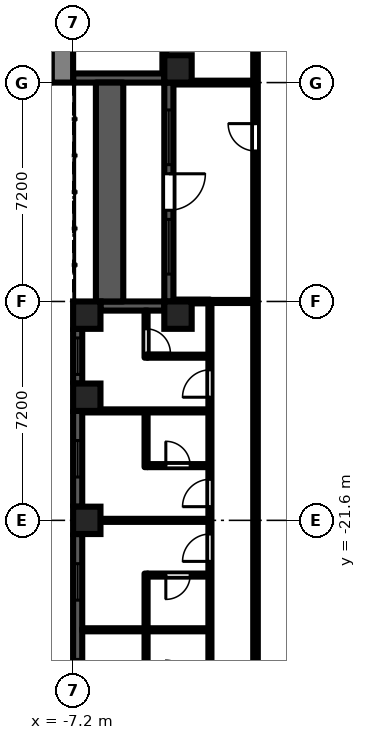
"""IFC4 building model, lengths in metres.
Left out: names, types, materials, properties, quantities, classifications, styles, units other than length and angle.
Written with IfcOpenShell. Run it as: python <this file> out.ifc"""

import sys

from ifc_helpers import new_model, si_unit, direction, frame, frame_2d, origin, origin_2d, place, context, subcontext, project, spatial, rectangle, extrude, element, fill, save


model = new_model("IFC4")
c1 = context("Model", 3, precision=1e-05, world=origin(), true_north=direction((0.0, 1.0)))
c2 = subcontext(c1, "Body", "Model", "MODEL_VIEW")
j1 = project(units=[si_unit("LENGTHUNIT", "METRE"), si_unit("PLANEANGLEUNIT", "RADIAN")], contexts=[c1])
p1 = place(None, origin())
s1 = spatial("IfcSite", under=j1, at=p1, CompositionType="ELEMENT")
p2 = place(p1, origin())
s2 = spatial("IfcBuilding", under=s1, at=p2, CompositionType="ELEMENT")
p3 = place(p2, frame((0.0, 0.0, 11.7)))
s3 = spatial("IfcBuildingStorey", under=s2, at=p3, CompositionType="ELEMENT", Elevation=11.7)
for number, where, z_axis, x_axis in (
    (1, (-6.75, -21.6, 0.0), (0.0, 0.0, 1.0), (1.0, 0.0, 0.0)),
    (2, (-6.75, -17.55, 0.0), (0.0, 0.0, 1.0), (1.0, 0.0, 0.0)),
    (3, (-6.75, -14.85, 0.0), (0.0, 0.0, 1.0), (1.0, 0.0, 0.0)),
    (4, (-3.75, -14.85, 0.0), (0.0, 0.0, 1.0), (1.0, 0.0, 0.0)),
    (5, (-3.75, -6.75, 0.0), (0.0, 0.0, 1.0), (1.0, 0.0, 0.0)),
):
    element("IfcColumn", number, at=place(p3, frame(where, z_axis=z_axis, x_axis=x_axis)), inside=s3, PredefinedType="COLUMN", context=c2, shape_type="SweptSolid", body=[
        extrude(rectangle(XDim=0.9, YDim=0.9, at=origin_2d()), origin(), (0.0, 0.0, 1.0), 3.0),
    ])
p4 = place(p3, frame((-7.2, -7.05, 0.0), z_axis=(0.0, 0.0, 1.0), x_axis=(1.0, 0.0, 0.0)))
e6 = element("IfcWall", 6, at=p4, inside=s3, PredefinedType="SOLIDWALL", context=c2, shape_type="SweptSolid", body=[
    extrude(rectangle(XDim=3.0, YDim=0.3, at=frame_2d((1.5, 0.0))), origin(), (0.0, 0.0, 1.0), 2.1),
])
p5 = place(p3, frame((-4.05, -7.2, 0.0), z_axis=(0.0, 0.0, 1.0), x_axis=(0.0, -1.0, 0.0)))
e7 = element("IfcWall", 7, at=p5, inside=s3, PredefinedType="SOLIDWALL", context=c2, shape_type="SweptSolid", body=[
    extrude(rectangle(XDim=7.2, YDim=0.3, at=frame_2d((3.6, 0.0))), origin(), (0.0, 0.0, 1.0), 2.1),
])
p6 = place(p5, frame((3.0, 0.0, 0.0)))
e8 = element("IfcOpeningElement", 8, at=p6, cuts=e7, PredefinedType="OPENING", context=c2, shape_type="SweptSolid", body=[
    extrude(rectangle(XDim=1.2, YDim=2.05, at=frame_2d((0.6, 1.025))), frame((0.0, 0.16, 0.0), z_axis=(0.0, -1.0, 0.0), x_axis=(1.0, 0.0, 0.0)), (0.0, 0.0, 1.0), 0.32),
])
p7 = place(p5, frame((0.9, 0.0, 0.2)))
e9 = element("IfcOpeningElement", 9, at=p7, cuts=e7, PredefinedType="OPENING", context=c2, shape_type="SweptSolid", body=[
    extrude(rectangle(XDim=1.8, YDim=1.85, at=frame_2d((0.9, 0.925))), frame((0.0, 0.16, 0.0), z_axis=(0.0, -1.0, 0.0), x_axis=(1.0, 0.0, 0.0)), (0.0, 0.0, 1.0), 0.32),
])
p8 = place(p5, frame((4.5, 0.0, 0.2)))
e10 = element("IfcOpeningElement", 10, at=p8, cuts=e7, PredefinedType="OPENING", context=c2, shape_type="SweptSolid", body=[
    extrude(rectangle(XDim=1.8, YDim=1.85, at=frame_2d((0.9, 0.925))), frame((0.0, 0.16, 0.0), z_axis=(0.0, -1.0, 0.0), x_axis=(1.0, 0.0, 0.0)), (0.0, 0.0, 1.0), 0.32),
])
p9 = place(p3, frame((-4.2, -14.55, 0.0), z_axis=(0.0, 0.0, 1.0), x_axis=(-1.0, 0.0, 0.0)))
e11 = element("IfcWall", 11, at=p9, inside=s3, PredefinedType="SOLIDWALL", context=c2, shape_type="SweptSolid", body=[
    extrude(rectangle(XDim=2.1, YDim=0.3, at=frame_2d((1.05, 0.0))), origin(), (0.0, 0.0, 1.0), 2.1),
])
p10 = place(p3, frame((-7.05, -15.3, 0.0), z_axis=(0.0, 0.0, 1.0), x_axis=(0.0, -1.0, 0.0)))
e12 = element("IfcWall", 12, at=p10, inside=s3, PredefinedType="SOLIDWALL", context=c2, shape_type="SweptSolid", body=[
    extrude(rectangle(XDim=1.8, YDim=0.3, at=frame_2d((0.9, 0.0))), origin(), (0.0, 0.0, 1.0), 2.1),
])
p11 = place(p10, frame((0.3, 0.0, 0.2)))
e13 = element("IfcOpeningElement", 13, at=p11, cuts=e12, PredefinedType="OPENING", context=c2, shape_type="SweptSolid", body=[
    extrude(rectangle(XDim=1.2, YDim=1.85, at=frame_2d((0.6, 0.925))), frame((0.0, 0.16, 0.0), z_axis=(0.0, -1.0, 0.0), x_axis=(1.0, 0.0, 0.0)), (0.0, 0.0, 1.0), 0.32),
])
p12 = place(p3, frame((-7.05, -18.0, 0.0), z_axis=(0.0, 0.0, 1.0), x_axis=(0.0, -1.0, 0.0)))
e14 = element("IfcWall", 14, at=p12, inside=s3, PredefinedType="SOLIDWALL", context=c2, shape_type="SweptSolid", body=[
    extrude(rectangle(XDim=3.15, YDim=0.3, at=frame_2d((1.575, 0.0))), origin(), (0.0, 0.0, 1.0), 2.1),
])
p13 = place(p12, frame((0.975, 0.0, 0.2)))
e15 = element("IfcOpeningElement", 15, at=p13, cuts=e14, PredefinedType="OPENING", context=c2, shape_type="SweptSolid", body=[
    extrude(rectangle(XDim=1.2, YDim=1.85, at=frame_2d((0.6, 0.925))), frame((0.0, 0.16, 0.0), z_axis=(0.0, -1.0, 0.0), x_axis=(1.0, 0.0, 0.0)), (0.0, 0.0, 1.0), 0.32),
])
p14 = place(p3, frame((-7.05, -22.05, 0.0), z_axis=(0.0, 0.0, 1.0), x_axis=(0.0, -1.0, 0.0)))
e16 = element("IfcWall", 16, at=p14, inside=s3, PredefinedType="SOLIDWALL", context=c2, shape_type="SweptSolid", body=[
    extrude(rectangle(XDim=6.3, YDim=0.3, at=frame_2d((3.15, 0.0))), origin(), (0.0, 0.0, 1.0), 2.1),
])
p15 = place(p14, frame((0.975, 0.0, 0.2)))
e17 = element("IfcOpeningElement", 17, at=p15, cuts=e16, PredefinedType="OPENING", context=c2, shape_type="SweptSolid", body=[
    extrude(rectangle(XDim=1.2, YDim=1.85, at=frame_2d((0.6, 0.925))), frame((0.0, 0.16, 0.0), z_axis=(0.0, -1.0, 0.0), x_axis=(1.0, 0.0, 0.0)), (0.0, 0.0, 1.0), 0.32),
])
p16 = place(p14, frame((4.125, 0.0, 0.2)))
e18 = element("IfcOpeningElement", 18, at=p16, cuts=e16, PredefinedType="OPENING", context=c2, shape_type="SweptSolid", body=[
    extrude(rectangle(XDim=1.2, YDim=1.85, at=frame_2d((0.6, 0.925))), frame((0.0, 0.16, 0.0), z_axis=(0.0, -1.0, 0.0), x_axis=(1.0, 0.0, 0.0)), (0.0, 0.0, 1.0), 0.32),
])
p17 = place(p3, frame((-6.0, -14.4, 0.0), z_axis=(0.0, 0.0, 1.0), x_axis=(0.0, 1.0, 0.0)))
e19 = element("IfcWall", 19, at=p17, inside=s3, PredefinedType="PARAPET", context=c2, shape_type="SweptSolid", body=[
    extrude(rectangle(XDim=7.2, YDim=0.9, at=frame_2d((3.6, 0.0))), origin(), (0.0, 0.0, 1.0), 0.8),
])
p18 = place(p3, frame((-7.55, -7.2, 0.0), z_axis=(0.0, 0.0, 1.0), x_axis=(0.0, 1.0, 0.0)))
e20 = element("IfcWall", 20, at=p18, inside=s3, PredefinedType="SHEAR", context=c2, shape_type="SweptSolid", body=[
    extrude(rectangle(XDim=14.4, YDim=0.7, at=frame_2d((7.2, 0.0))), origin(), (0.0, 0.0, 1.0), 2.575),
])
p19 = place(p18, frame((6.0, 0.0, 0.0)))
e21 = element("IfcOpeningElement", 21, at=p19, cuts=e20, PredefinedType="OPENING", context=c2, shape_type="SweptSolid", body=[
    extrude(rectangle(XDim=2.4, YDim=2.2, at=frame_2d((1.2, 1.1))), frame((0.0, 0.36, 0.0), z_axis=(0.0, -1.0, 0.0), x_axis=(1.0, 0.0, 0.0)), (0.0, 0.0, 1.0), 0.72),
])
for number, where, z_axis, x_axis in (
    (22, (-6.9, -25.2, 0.0), (0.0, 0.0, 1.0), (1.0, 0.0, 0.0)),
    (23, (-6.9, -21.6, 0.0), (0.0, 0.0, 1.0), (1.0, 0.0, 0.0)),
    (24, (-6.9, -18.0, 0.0), (0.0, 0.0, 1.0), (1.0, 0.0, 0.0)),
):
    element("IfcWall", number, at=place(p3, frame(where, z_axis=z_axis, x_axis=x_axis)), inside=s3, PredefinedType="PARTITIONING", context=c2, shape_type="SweptSolid", body=[
        extrude(rectangle(XDim=4.15, YDim=0.1, at=frame_2d((2.075, 0.0))), origin(), (0.0, 0.0, 1.0), 2.575),
    ])
p20 = place(p3, frame((-4.8, -27.05, 0.0), z_axis=(0.0, 0.0, 1.0), x_axis=(0.0, 1.0, 0.0)))
e25 = element("IfcWall", 25, at=p20, inside=s3, PredefinedType="PARTITIONING", context=c2, shape_type="SweptSolid", body=[
    extrude(rectangle(XDim=3.7, YDim=0.1, at=frame_2d((1.85, 0.0))), origin(), (0.0, 0.0, 1.0), 2.575),
])
p21 = place(p3, frame((-4.75, -23.4, 0.0), z_axis=(0.0, 0.0, 1.0), x_axis=(1.0, 0.0, 0.0)))
e26 = element("IfcWall", 26, at=p21, inside=s3, PredefinedType="PARTITIONING", context=c2, shape_type="SweptSolid", body=[
    extrude(rectangle(XDim=2.0, YDim=0.1, at=frame_2d((1.0, 0.0))), origin(), (0.0, 0.0, 1.0), 2.575),
])
p22 = place(p21, frame((0.6, 0.0, 0.0)))
e27 = element("IfcOpeningElement", 27, at=p22, cuts=e26, PredefinedType="OPENING", context=c2, shape_type="SweptSolid", body=[
    extrude(rectangle(XDim=0.8, YDim=2.1, at=frame_2d((0.4, 1.05))), frame((0.0, 0.06, 0.0), z_axis=(0.0, -1.0, 0.0), x_axis=(1.0, 0.0, 0.0)), (0.0, 0.0, 1.0), 0.12),
])
p23 = place(p3, frame((-4.8, -19.85, 0.0), z_axis=(0.0, 0.0, 1.0), x_axis=(0.0, 1.0, 0.0)))
e28 = element("IfcWall", 28, at=p23, inside=s3, PredefinedType="PARTITIONING", context=c2, shape_type="SweptSolid", body=[
    extrude(rectangle(XDim=1.8, YDim=0.1, at=frame_2d((0.9, 0.0))), origin(), (0.0, 0.0, 1.0), 2.575),
])
p24 = place(p3, frame((-4.75, -19.8, 0.0), z_axis=(0.0, 0.0, 1.0), x_axis=(1.0, 0.0, 0.0)))
e29 = element("IfcWall", 29, at=p24, inside=s3, PredefinedType="PARTITIONING", context=c2, shape_type="SweptSolid", body=[
    extrude(rectangle(XDim=2.0, YDim=0.1, at=frame_2d((1.0, 0.0))), origin(), (0.0, 0.0, 1.0), 2.575),
])
p25 = place(p24, frame((0.6, 0.0, 0.0)))
e30 = element("IfcOpeningElement", 30, at=p25, cuts=e29, PredefinedType="OPENING", context=c2, shape_type="SweptSolid", body=[
    extrude(rectangle(XDim=0.8, YDim=2.1, at=frame_2d((0.4, 1.05))), frame((0.0, 0.06, 0.0), z_axis=(0.0, -1.0, 0.0), x_axis=(1.0, 0.0, 0.0)), (0.0, 0.0, 1.0), 0.12),
])
p26 = place(p3, frame((-4.8, -16.25, 0.0), z_axis=(0.0, 0.0, 1.0), x_axis=(0.0, 1.0, 0.0)))
e31 = element("IfcWall", 31, at=p26, inside=s3, PredefinedType="PARTITIONING", context=c2, shape_type="SweptSolid", body=[
    extrude(rectangle(XDim=1.55, YDim=0.1, at=frame_2d((0.775, 0.0))), origin(), (0.0, 0.0, 1.0), 2.575),
])
p27 = place(p26, frame((0.15, 0.0, 0.0)))
e32 = element("IfcOpeningElement", 32, at=p27, cuts=e31, PredefinedType="OPENING", context=c2, shape_type="SweptSolid", body=[
    extrude(rectangle(XDim=0.8, YDim=2.1, at=frame_2d((0.4, 1.05))), frame((0.0, 0.06, 0.0), z_axis=(0.0, -1.0, 0.0), x_axis=(1.0, 0.0, 0.0)), (0.0, 0.0, 1.0), 0.12),
])
p28 = place(p3, frame((-4.75, -16.2, 0.0), z_axis=(0.0, 0.0, 1.0), x_axis=(1.0, 0.0, 0.0)))
e33 = element("IfcWall", 33, at=p28, inside=s3, PredefinedType="PARTITIONING", context=c2, shape_type="SweptSolid", body=[
    extrude(rectangle(XDim=2.0, YDim=0.1, at=frame_2d((1.0, 0.0))), origin(), (0.0, 0.0, 1.0), 2.575),
])
p29 = place(p3, frame((-4.2, -6.9, 0.0), z_axis=(0.0, 0.0, 1.0), x_axis=(0.0, 1.0, 0.0)))
e34 = element("IfcWall", 34, at=p29, inside=s3, PredefinedType="PARTITIONING", context=c2, shape_type="SweptSolid", body=[
    extrude(rectangle(XDim=5.625, YDim=0.125, at=frame_2d((2.812, 0.0))), origin(), (0.0, 0.0, 1.0), 2.575),
])
p30 = place(p3, frame((-3.9, -14.4, 0.0), z_axis=(0.0, 0.0, 1.0), x_axis=(1.0, 0.0, 0.0)))
e35 = element("IfcWall", 35, at=p30, inside=s3, PredefinedType="PARTITIONING", context=c2, shape_type="SweptSolid", body=[
    extrude(rectangle(XDim=1.2, YDim=0.125, at=frame_2d((0.6, 0.0))), origin(), (0.0, 0.0, 1.0), 2.575),
])
p31 = place(p3, frame((-3.9, -7.2, 0.0), z_axis=(0.0, 0.0, 1.0), x_axis=(1.0, 0.0, 0.0)))
e36 = element("IfcWall", 36, at=p31, inside=s3, PredefinedType="PARTITIONING", context=c2, shape_type="SweptSolid", body=[
    extrude(rectangle(XDim=2.625, YDim=0.125, at=frame_2d((1.312, 0.0))), origin(), (0.0, 0.0, 1.0), 2.575),
])
p32 = place(p3, frame((-2.7, -32.35, 0.0), z_axis=(0.0, 0.0, 1.0), x_axis=(0.0, 1.0, 0.0)))
e37 = element("IfcWall", 37, at=p32, inside=s3, PredefinedType="PARTITIONING", context=c2, shape_type="SweptSolid", body=[
    extrude(rectangle(XDim=17.888, YDim=0.1, at=frame_2d((8.944, 0.0))), origin(), (0.0, 0.0, 1.0), 2.575),
])
p33 = place(p32, frame((2.2, 0.0, 0.0)))
e38 = element("IfcOpeningElement", 38, at=p33, cuts=e37, PredefinedType="OPENING", context=c2, shape_type="SweptSolid", body=[
    extrude(rectangle(XDim=0.9, YDim=2.1, at=frame_2d((0.45, 1.05))), frame((0.0, 0.06, 0.0), z_axis=(0.0, -1.0, 0.0), x_axis=(1.0, 0.0, 0.0)), (0.0, 0.0, 1.0), 0.12),
])
p34 = place(p32, frame((4.0, 0.0, 0.0)))
e39 = element("IfcOpeningElement", 39, at=p34, cuts=e37, PredefinedType="OPENING", context=c2, shape_type="SweptSolid", body=[
    extrude(rectangle(XDim=0.9, YDim=2.1, at=frame_2d((0.45, 1.05))), frame((0.0, 0.06, 0.0), z_axis=(0.0, -1.0, 0.0), x_axis=(1.0, 0.0, 0.0)), (0.0, 0.0, 1.0), 0.12),
])
p35 = place(p32, frame((9.4, 0.0, 0.0)))
e40 = element("IfcOpeningElement", 40, at=p35, cuts=e37, PredefinedType="OPENING", context=c2, shape_type="SweptSolid", body=[
    extrude(rectangle(XDim=0.9, YDim=2.1, at=frame_2d((0.45, 1.05))), frame((0.0, 0.06, 0.0), z_axis=(0.0, -1.0, 0.0), x_axis=(1.0, 0.0, 0.0)), (0.0, 0.0, 1.0), 0.12),
])
p36 = place(p32, frame((11.2, 0.0, 0.0)))
e41 = element("IfcOpeningElement", 41, at=p36, cuts=e37, PredefinedType="OPENING", context=c2, shape_type="SweptSolid", body=[
    extrude(rectangle(XDim=0.9, YDim=2.1, at=frame_2d((0.45, 1.05))), frame((0.0, 0.06, 0.0), z_axis=(0.0, -1.0, 0.0), x_axis=(1.0, 0.0, 0.0)), (0.0, 0.0, 1.0), 0.12),
])
p37 = place(p32, frame((14.8, 0.0, 0.0)))
e42 = element("IfcOpeningElement", 42, at=p37, cuts=e37, PredefinedType="OPENING", context=c2, shape_type="SweptSolid", body=[
    extrude(rectangle(XDim=0.9, YDim=2.1, at=frame_2d((0.45, 1.05))), frame((0.0, 0.06, 0.0), z_axis=(0.0, -1.0, 0.0), x_axis=(1.0, 0.0, 0.0)), (0.0, 0.0, 1.0), 0.12),
])
p38 = place(p3, frame((-2.7, -14.4, 0.0), z_axis=(0.0, 0.0, 1.0), x_axis=(1.0, 0.0, 0.0)))
e43 = element("IfcWall", 43, at=p38, inside=s3, PredefinedType="PARTITIONING", context=c2, shape_type="SweptSolid", body=[
    extrude(rectangle(XDim=1.425, YDim=0.1, at=frame_2d((0.712, 0.0))), origin(), (0.0, 0.0, 1.0), 2.575),
])
p39 = place(p3, frame((-1.2, -36.5, 0.0), z_axis=(0.0, 0.0, 1.0), x_axis=(0.0, 1.0, 0.0)))
e44 = element("IfcWall", 44, at=p39, inside=s3, PredefinedType="PARTITIONING", context=c2, shape_type="SweptSolid", body=[
    extrude(rectangle(XDim=35.375, YDim=0.15, at=frame_2d((17.688, 0.0))), origin(), (0.0, 0.0, 1.0), 2.575),
])
p40 = place(p39, frame((31.85, 0.0, 0.0)))
e45 = element("IfcOpeningElement", 45, at=p40, cuts=e44, PredefinedType="OPENING", context=c2, shape_type="SweptSolid", body=[
    extrude(rectangle(XDim=0.9, YDim=2.1, at=frame_2d((0.45, 1.05))), frame((0.0, 0.085, 0.0), z_axis=(0.0, -1.0, 0.0), x_axis=(1.0, 0.0, 0.0)), (0.0, 0.0, 1.0), 0.17),
])
p41 = place(p39, frame((27.05, 0.0, 0.0)))
e46 = element("IfcOpeningElement", 46, at=p41, cuts=e44, PredefinedType="OPENING", context=c2, shape_type="SweptSolid", body=[
    extrude(rectangle(XDim=0.9, YDim=2.1, at=frame_2d((0.45, 1.05))), frame((0.0, 0.085, 0.0), z_axis=(0.0, -1.0, 0.0), x_axis=(1.0, 0.0, 0.0)), (0.0, 0.0, 1.0), 0.17),
])
p42 = place(p39, frame((1.55, 0.0, 0.0)))
e47 = element("IfcOpeningElement", 47, at=p42, cuts=e44, PredefinedType="OPENING", context=c2, shape_type="SweptSolid", body=[
    extrude(rectangle(XDim=1.0, YDim=2.1, at=frame_2d((0.5, 1.05))), frame((0.0, 0.085, 0.0), z_axis=(0.0, -1.0, 0.0), x_axis=(1.0, 0.0, 0.0)), (0.0, 0.0, 1.0), 0.17),
])
p43 = place(p6, origin())
e48 = element("IfcDoor", 48, at=p43, inside=s3, OperationType="SINGLE_SWING_LEFT", PredefinedType="DOOR", context=c2, shape_type="SweptSolid", body=[
    extrude(rectangle(XDim=1.2, YDim=2.05, at=frame_2d((0.6, 1.025))), frame((0.0, 0.025, 0.0), z_axis=(0.0, -1.0, 0.0), x_axis=(1.0, 0.0, 0.0)), (0.0, 0.0, 1.0), 0.05),
])
fill(e8, e48)
p44 = place(p7, origin())
e49 = element("IfcWindow", 49, at=p44, inside=s3, PartitioningType="SINGLE_PANEL", PredefinedType="WINDOW", context=c2, shape_type="SweptSolid", body=[
    extrude(rectangle(XDim=1.8, YDim=1.85, at=frame_2d((0.9, 0.925))), frame((0.0, 0.03, 0.0), z_axis=(0.0, -1.0, 0.0), x_axis=(1.0, 0.0, 0.0)), (0.0, 0.0, 1.0), 0.06),
])
fill(e9, e49)
p45 = place(p8, origin())
e50 = element("IfcWindow", 50, at=p45, inside=s3, PartitioningType="SINGLE_PANEL", PredefinedType="WINDOW", context=c2, shape_type="SweptSolid", body=[
    extrude(rectangle(XDim=1.8, YDim=1.85, at=frame_2d((0.9, 0.925))), frame((0.0, 0.03, 0.0), z_axis=(0.0, -1.0, 0.0), x_axis=(1.0, 0.0, 0.0)), (0.0, 0.0, 1.0), 0.06),
])
fill(e10, e50)
p46 = place(p11, origin())
e51 = element("IfcWindow", 51, at=p46, inside=s3, PartitioningType="SINGLE_PANEL", PredefinedType="WINDOW", context=c2, shape_type="SweptSolid", body=[
    extrude(rectangle(XDim=1.2, YDim=1.85, at=frame_2d((0.6, 0.925))), frame((0.0, 0.03, 0.0), z_axis=(0.0, -1.0, 0.0), x_axis=(1.0, 0.0, 0.0)), (0.0, 0.0, 1.0), 0.06),
])
fill(e13, e51)
p47 = place(p13, origin())
e52 = element("IfcWindow", 52, at=p47, inside=s3, PartitioningType="SINGLE_PANEL", PredefinedType="WINDOW", context=c2, shape_type="SweptSolid", body=[
    extrude(rectangle(XDim=1.2, YDim=1.85, at=frame_2d((0.6, 0.925))), frame((0.0, 0.03, 0.0), z_axis=(0.0, -1.0, 0.0), x_axis=(1.0, 0.0, 0.0)), (0.0, 0.0, 1.0), 0.06),
])
fill(e15, e52)
p48 = place(p15, origin())
e53 = element("IfcWindow", 53, at=p48, inside=s3, PartitioningType="SINGLE_PANEL", PredefinedType="WINDOW", context=c2, shape_type="SweptSolid", body=[
    extrude(rectangle(XDim=1.2, YDim=1.85, at=frame_2d((0.6, 0.925))), frame((0.0, 0.03, 0.0), z_axis=(0.0, -1.0, 0.0), x_axis=(1.0, 0.0, 0.0)), (0.0, 0.0, 1.0), 0.06),
])
fill(e17, e53)
p49 = place(p16, origin())
e54 = element("IfcWindow", 54, at=p49, inside=s3, PartitioningType="SINGLE_PANEL", PredefinedType="WINDOW", context=c2, shape_type="SweptSolid", body=[
    extrude(rectangle(XDim=1.2, YDim=1.85, at=frame_2d((0.6, 0.925))), frame((0.0, 0.03, 0.0), z_axis=(0.0, -1.0, 0.0), x_axis=(1.0, 0.0, 0.0)), (0.0, 0.0, 1.0), 0.06),
])
fill(e18, e54)
p50 = place(p41, origin())
e55 = element("IfcDoor", 55, at=p50, inside=s3, OperationType="SINGLE_SWING_RIGHT", PredefinedType="DOOR", context=c2, shape_type="SweptSolid", body=[
    extrude(rectangle(XDim=0.9, YDim=2.1, at=frame_2d((0.45, 1.05))), frame((0.0, 0.025, 0.0), z_axis=(0.0, -1.0, 0.0), x_axis=(1.0, 0.0, 0.0)), (0.0, 0.0, 1.0), 0.05),
])
fill(e46, e55)
p51 = place(p35, origin())
e56 = element("IfcDoor", 56, at=p51, inside=s3, OperationType="SINGLE_SWING_LEFT", PredefinedType="DOOR", context=c2, shape_type="SweptSolid", body=[
    extrude(rectangle(XDim=0.9, YDim=2.1, at=frame_2d((0.45, 1.05))), frame((0.0, 0.025, 0.0), z_axis=(0.0, -1.0, 0.0), x_axis=(1.0, 0.0, 0.0)), (0.0, 0.0, 1.0), 0.05),
])
fill(e40, e56)
p52 = place(p36, origin())
e57 = element("IfcDoor", 57, at=p52, inside=s3, OperationType="SINGLE_SWING_LEFT", PredefinedType="DOOR", context=c2, shape_type="SweptSolid", body=[
    extrude(rectangle(XDim=0.9, YDim=2.1, at=frame_2d((0.45, 1.05))), frame((0.0, 0.025, 0.0), z_axis=(0.0, -1.0, 0.0), x_axis=(1.0, 0.0, 0.0)), (0.0, 0.0, 1.0), 0.05),
])
fill(e41, e57)
p53 = place(p37, origin())
e58 = element("IfcDoor", 58, at=p53, inside=s3, OperationType="SINGLE_SWING_LEFT", PredefinedType="DOOR", context=c2, shape_type="SweptSolid", body=[
    extrude(rectangle(XDim=0.9, YDim=2.1, at=frame_2d((0.45, 1.05))), frame((0.0, 0.025, 0.0), z_axis=(0.0, -1.0, 0.0), x_axis=(1.0, 0.0, 0.0)), (0.0, 0.0, 1.0), 0.05),
])
fill(e42, e58)
p54 = place(p27, frame((0.8, 0.0, 0.0), z_axis=(0.0, 0.0, 1.0), x_axis=(-1.0, 0.0, 0.0)))
e59 = element("IfcDoor", 59, at=p54, inside=s3, OperationType="SINGLE_SWING_RIGHT", PredefinedType="DOOR", context=c2, shape_type="SweptSolid", body=[
    extrude(rectangle(XDim=0.8, YDim=2.1, at=frame_2d((0.4, 1.05))), frame((0.0, 0.025, 0.0), z_axis=(0.0, -1.0, 0.0), x_axis=(1.0, 0.0, 0.0)), (0.0, 0.0, 1.0), 0.05),
])
fill(e32, e59)
p55 = place(p25, origin())
e60 = element("IfcDoor", 60, at=p55, inside=s3, OperationType="SINGLE_SWING_LEFT", PredefinedType="DOOR", context=c2, shape_type="SweptSolid", body=[
    extrude(rectangle(XDim=0.8, YDim=2.1, at=frame_2d((0.4, 1.05))), frame((0.0, 0.025, 0.0), z_axis=(0.0, -1.0, 0.0), x_axis=(1.0, 0.0, 0.0)), (0.0, 0.0, 1.0), 0.05),
])
fill(e30, e60)
p56 = place(p22, frame((0.8, 0.0, 0.0), z_axis=(0.0, 0.0, 1.0), x_axis=(-1.0, 0.0, 0.0)))
e61 = element("IfcDoor", 61, at=p56, inside=s3, OperationType="SINGLE_SWING_RIGHT", PredefinedType="DOOR", context=c2, shape_type="SweptSolid", body=[
    extrude(rectangle(XDim=0.8, YDim=2.1, at=frame_2d((0.4, 1.05))), frame((0.0, 0.025, 0.0), z_axis=(0.0, -1.0, 0.0), x_axis=(1.0, 0.0, 0.0)), (0.0, 0.0, 1.0), 0.05),
])
fill(e27, e61)
save(model, sys.argv[1])
